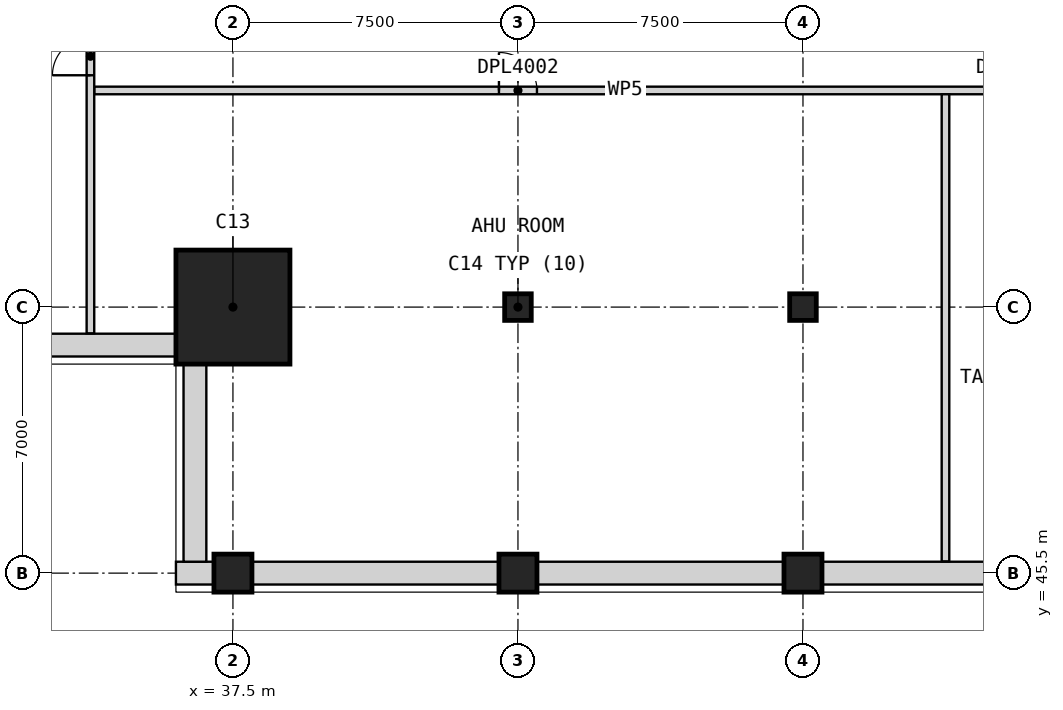
"""IFC4 building model, lengths in metres.
Left out: names, types, materials, properties, quantities, classifications, styles, units other than length and angle.
Written with IfcOpenShell. Run it as: python <this file> out.ifc"""

import sys

from ifc_helpers import new_model, si_unit, direction, frame, frame_2d, origin, origin_2d, place, context, subcontext, project, spatial, rectangle, extrude, element, fill, save


model = new_model("IFC4")
c1 = context("Model", 3, precision=1e-05, world=origin(), true_north=direction((0.0, 1.0)))
c2 = subcontext(c1, "Body", "Model", "MODEL_VIEW")
j1 = project(units=[si_unit("LENGTHUNIT", "METRE"), si_unit("PLANEANGLEUNIT", "RADIAN")], contexts=[c1])
p1 = place(None, origin())
s1 = spatial("IfcSite", under=j1, at=p1, CompositionType="ELEMENT")
p2 = place(p1, origin())
s2 = spatial("IfcBuilding", under=s1, at=p2, CompositionType="ELEMENT")
p3 = place(p2, frame((0.0, 0.0, 314.7)))
s3 = spatial("IfcBuildingStorey", under=s2, at=p3, CompositionType="ELEMENT", Elevation=314.7)
for number, where, z_axis, x_axis in (
    (1, (37.5, 45.5, 0.0), (0.0, 0.0, 1.0), (1.0, 0.0, 0.0)),
    (2, (45.0, 45.5, 0.0), (0.0, 0.0, 1.0), (1.0, 0.0, 0.0)),
):
    element("IfcColumn", number, at=place(p3, frame(where, z_axis=z_axis, x_axis=x_axis)), inside=s3, PredefinedType="COLUMN", context=c2, shape_type="SweptSolid", body=[
        extrude(rectangle(XDim=1.0, YDim=1.0, at=origin_2d()), origin(), (0.0, 0.0, 1.0), 5.5),
    ])
p4 = place(p3, frame((45.0, 52.5, 0.0), z_axis=(0.0, 0.0, 1.0), x_axis=(1.0, 0.0, 0.0)))
e3 = element("IfcColumn", 3, at=p4, inside=s3, PredefinedType="COLUMN", context=c2, shape_type="SweptSolid", body=[
    extrude(rectangle(XDim=0.7, YDim=0.7, at=origin_2d()), origin(), (0.0, 0.0, 1.0), 5.5),
])
p5 = place(p3, frame((52.5, 45.5, 0.0), z_axis=(0.0, 0.0, 1.0), x_axis=(1.0, 0.0, 0.0)))
e4 = element("IfcColumn", 4, at=p5, inside=s3, PredefinedType="COLUMN", context=c2, shape_type="SweptSolid", body=[
    extrude(rectangle(XDim=1.0, YDim=1.0, at=origin_2d()), origin(), (0.0, 0.0, 1.0), 5.5),
])
p6 = place(p3, frame((52.5, 52.5, 0.0), z_axis=(0.0, 0.0, 1.0), x_axis=(1.0, 0.0, 0.0)))
e5 = element("IfcColumn", 5, at=p6, inside=s3, PredefinedType="COLUMN", context=c2, shape_type="SweptSolid", body=[
    extrude(rectangle(XDim=0.7, YDim=0.7, at=origin_2d()), origin(), (0.0, 0.0, 1.0), 5.5),
])
p7 = place(p3, frame((37.5, 52.5, 0.0), z_axis=(0.0, 0.0, 1.0), x_axis=(1.0, 0.0, 0.0)))
e6 = element("IfcColumn", 6, at=p7, inside=s3, PredefinedType="COLUMN", context=c2, shape_type="SweptSolid", body=[
    extrude(rectangle(XDim=3.0, YDim=3.0, at=origin_2d()), origin(), (0.0, 0.0, 1.0), 5.5),
])
p8 = place(p3, frame((36.0, 45.5, 0.0), z_axis=(0.0, 0.0, 1.0), x_axis=(1.0, 0.0, 0.0)))
e7 = element("IfcWall", 7, at=p8, inside=s3, PredefinedType="ELEMENTEDWALL", context=c2, shape_type="SweptSolid", body=[
    extrude(rectangle(XDim=1.0, YDim=0.6, at=frame_2d((0.5, 0.0))), origin(), (0.0, 0.0, 1.0), 5.1),
])
for number, where, z_axis, x_axis in (
    (8, (38.0, 45.5, 0.0), (0.0, 0.0, 1.0), (1.0, 0.0, 0.0)),
    (9, (45.5, 45.5, 0.0), (0.0, 0.0, 1.0), (1.0, 0.0, 0.0)),
    (10, (53.0, 45.5, 0.0), (0.0, 0.0, 1.0), (1.0, 0.0, 0.0)),
):
    element("IfcWall", number, at=place(p3, frame(where, z_axis=z_axis, x_axis=x_axis)), inside=s3, PredefinedType="ELEMENTEDWALL", context=c2, shape_type="SweptSolid", body=[
        extrude(rectangle(XDim=6.5, YDim=0.6, at=frame_2d((3.25, 0.0))), origin(), (0.0, 0.0, 1.0), 5.1),
    ])
for number, where, z_axis, x_axis in (
    (11, (30.8, 51.5, 0.0), (0.0, 0.0, 1.0), (1.0, 0.0, 0.0)),
    (12, (36.5, 51.0, 0.0), (0.0, 0.0, 1.0), (0.0, -1.0, 0.0)),
):
    element("IfcWall", number, at=place(p3, frame(where, z_axis=z_axis, x_axis=x_axis)), inside=s3, PredefinedType="ELEMENTEDWALL", context=c2, shape_type="SweptSolid", body=[
        extrude(rectangle(XDim=5.2, YDim=0.6, at=frame_2d((2.6, 0.0))), origin(), (0.0, 0.0, 1.0), 5.1),
    ])
p9 = place(p3, frame((33.85, 58.2, 0.0), z_axis=(0.0, 0.0, 1.0), x_axis=(1.0, 0.0, 0.0)))
e13 = element("IfcWall", 13, at=p9, inside=s3, PredefinedType="PARTITIONING", context=c2, shape_type="SweptSolid", body=[
    extrude(rectangle(XDim=27.95, YDim=0.2, at=frame_2d((13.975, 0.0))), origin(), (0.0, 0.0, 1.0), 5.1),
])
p10 = place(p9, frame((10.65, 0.0, 0.0)))
e14 = element("IfcOpeningElement", 14, at=p10, cuts=e13, PredefinedType="OPENING", context=c2, shape_type="SweptSolid", body=[
    extrude(rectangle(XDim=1.0, YDim=2.1, at=frame_2d((0.5, 1.05))), frame((0.0, 0.11, 0.0), z_axis=(0.0, -1.0, 0.0), x_axis=(1.0, 0.0, 0.0)), (0.0, 0.0, 1.0), 0.22),
])
p11 = place(p9, frame((23.775, 0.0, 0.0)))
e15 = element("IfcOpeningElement", 15, at=p11, cuts=e13, PredefinedType="OPENING", context=c2, shape_type="SweptSolid", body=[
    extrude(rectangle(XDim=1.0, YDim=2.1, at=frame_2d((0.5, 1.05))), frame((0.0, 0.11, 0.0), z_axis=(0.0, -1.0, 0.0), x_axis=(1.0, 0.0, 0.0)), (0.0, 0.0, 1.0), 0.22),
])
p12 = place(p9, frame((26.55, 0.0, 0.0)))
e16 = element("IfcOpeningElement", 16, at=p12, cuts=e13, PredefinedType="OPENING", context=c2, shape_type="SweptSolid", body=[
    extrude(rectangle(XDim=1.0, YDim=2.1, at=frame_2d((0.5, 1.05))), frame((0.0, 0.11, 0.0), z_axis=(0.0, -1.0, 0.0), x_axis=(1.0, 0.0, 0.0)), (0.0, 0.0, 1.0), 0.22),
])
p13 = place(p3, frame((33.75, 51.81, 0.0), z_axis=(0.0, 0.0, 1.0), x_axis=(0.0, 1.0, 0.0)))
e17 = element("IfcWall", 17, at=p13, inside=s3, PredefinedType="PARTITIONING", context=c2, shape_type="SweptSolid", body=[
    extrude(rectangle(XDim=8.19, YDim=0.2, at=frame_2d((4.095, 0.0))), origin(), (0.0, 0.0, 1.0), 5.1),
])
p14 = place(p13, frame((6.79, 0.0, 0.0)))
e18 = element("IfcOpeningElement", 18, at=p14, cuts=e17, PredefinedType="OPENING", context=c2, shape_type="SweptSolid", body=[
    extrude(rectangle(XDim=1.0, YDim=2.1, at=frame_2d((0.5, 1.05))), frame((0.0, 0.11, 0.0), z_axis=(0.0, -1.0, 0.0), x_axis=(1.0, 0.0, 0.0)), (0.0, 0.0, 1.0), 0.22),
])
p15 = place(p3, frame((56.25, 45.81, 0.0), z_axis=(0.0, 0.0, 1.0), x_axis=(0.0, 1.0, 0.0)))
e19 = element("IfcWall", 19, at=p15, inside=s3, PredefinedType="PARTITIONING", context=c2, shape_type="SweptSolid", body=[
    extrude(rectangle(XDim=12.29, YDim=0.2, at=frame_2d((6.145, 0.0))), origin(), (0.0, 0.0, 1.0), 5.1),
])
p16 = place(p14, origin())
e20 = element("IfcDoor", 20, at=p16, inside=s3, OperationType="SINGLE_SWING_RIGHT", PredefinedType="DOOR", context=c2, shape_type="SweptSolid", body=[
    extrude(rectangle(XDim=1.0, YDim=2.1, at=frame_2d((0.5, 1.05))), frame((0.0, 0.025, 0.0), z_axis=(0.0, -1.0, 0.0), x_axis=(1.0, 0.0, 0.0)), (0.0, 0.0, 1.0), 0.05),
])
fill(e18, e20)
p17 = place(p10, origin())
e21 = element("IfcDoor", 21, at=p17, inside=s3, OperationType="SINGLE_SWING_RIGHT", PredefinedType="DOOR", context=c2, shape_type="SweptSolid", body=[
    extrude(rectangle(XDim=1.0, YDim=2.1, at=frame_2d((0.5, 1.05))), frame((0.0, 0.025, 0.0), z_axis=(0.0, -1.0, 0.0), x_axis=(1.0, 0.0, 0.0)), (0.0, 0.0, 1.0), 0.05),
])
fill(e14, e21)
save(model, sys.argv[1])
